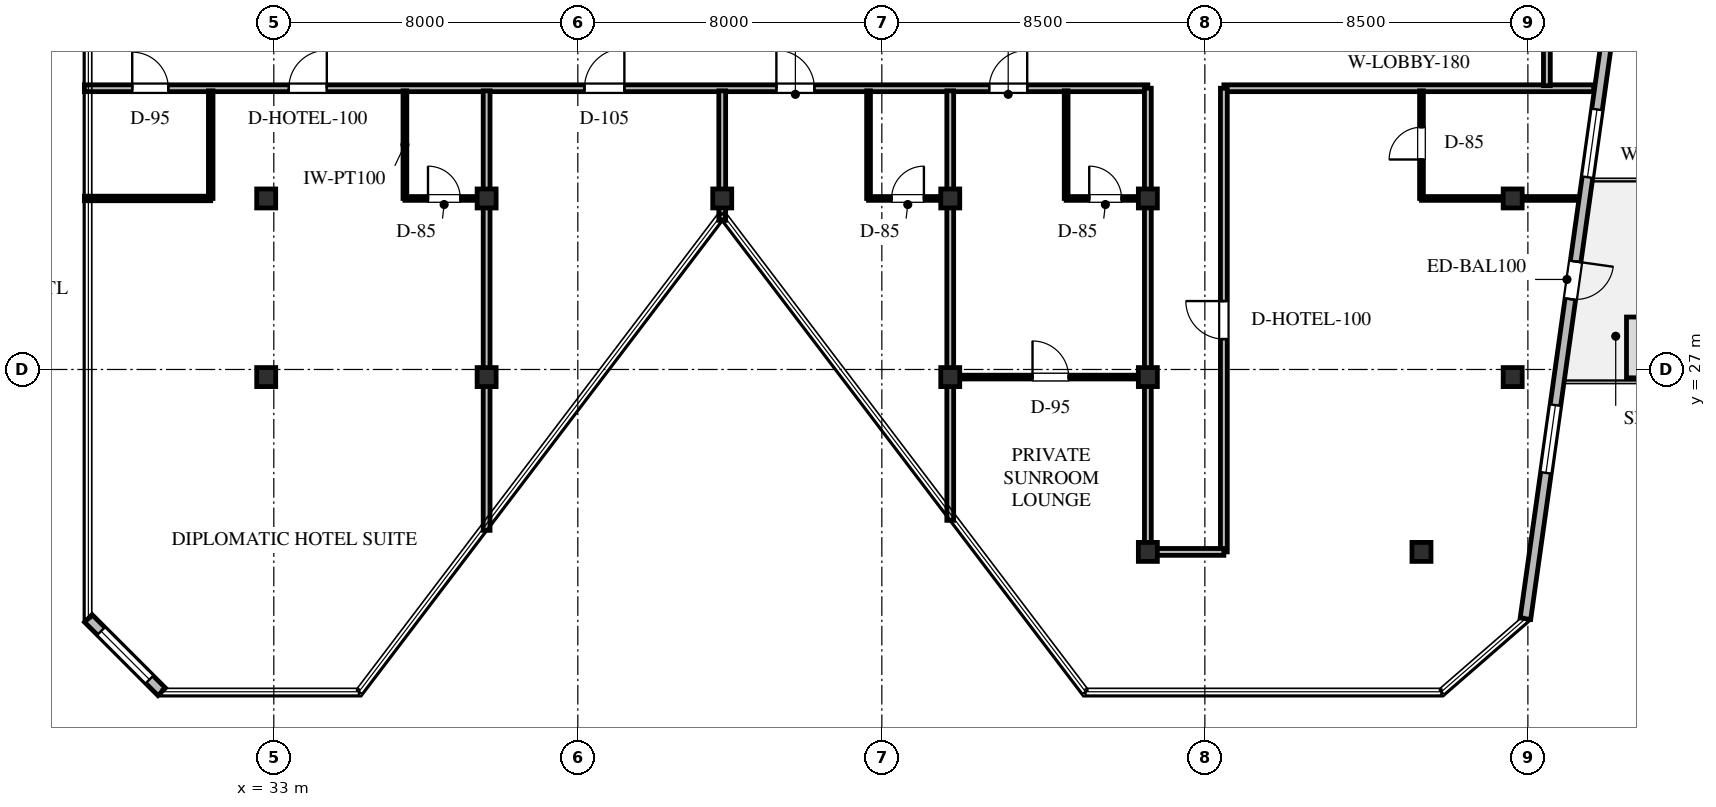
"""IFC4 building model, lengths in metres.
Left out: names, types, materials, properties, quantities, classifications, styles, units other than length and angle.
Written with IfcOpenShell. Run it as: python <this file> out.ifc"""

import sys

from ifc_helpers import new_model, si_unit, direction, frame, frame_2d, origin, origin_2d, place, context, subcontext, project, spatial, rectangle, hollow_rectangle, extrude, element, fill, save


model = new_model("IFC4")
c1 = context("Model", 3, precision=1e-05, world=origin(), true_north=direction((0.0, 1.0)))
c2 = subcontext(c1, "Body", "Model", "MODEL_VIEW")
j1 = project(units=[si_unit("LENGTHUNIT", "METRE"), si_unit("PLANEANGLEUNIT", "RADIAN")], contexts=[c1])
p1 = place(None, origin())
s1 = spatial("IfcSite", under=j1, at=p1, CompositionType="ELEMENT")
p2 = place(p1, origin())
s2 = spatial("IfcBuilding", under=s1, at=p2, CompositionType="ELEMENT")
p3 = place(p2, frame((0.0, 0.0, 270.6)))
s3 = spatial("IfcBuildingStorey", under=s2, at=p3, CompositionType="ELEMENT", Elevation=270.6)
for number, where, z_axis, x_axis in (
    (1, (44.8, 31.5, 0.0), (0.0, 0.0, 1.0), (1.0, 0.0, 0.0)),
    (2, (50.8, 31.5, 0.0), (0.0, 0.0, 1.0), (1.0, 0.0, 0.0)),
    (3, (56.0, 31.5, 0.0), (0.0, 0.0, 1.0), (1.0, 0.0, 0.0)),
    (4, (65.6, 31.5, 0.0), (0.0, 0.0, 1.0), (1.0, 0.0, 0.0)),
    (5, (38.6, 31.5, 0.0), (0.0, 0.0, 1.0), (1.0, 0.0, 0.0)),
    (6, (32.8, 31.5, 0.0), (0.0, 0.0, 1.0), (1.0, 0.0, 0.0)),
    (7, (38.6, 26.8, 0.0), (0.0, 0.0, 1.0), (1.0, 0.0, 0.0)),
    (8, (50.8, 26.8, 0.0), (0.0, 0.0, 1.0), (1.0, 0.0, 0.0)),
    (9, (56.0, 26.8, 0.0), (0.0, 0.0, 1.0), (1.0, 0.0, 0.0)),
    (10, (65.6, 26.8, 0.0), (0.0, 0.0, 1.0), (1.0, 0.0, 0.0)),
    (11, (56.0, 22.2, 0.0), (0.0, 0.0, 1.0), (1.0, 0.0, 0.0)),
    (12, (63.2, 22.2, 0.0), (0.0, 0.0, 1.0), (1.0, 0.0, 0.0)),
    (13, (32.8, 26.8, 0.0), (0.0, 0.0, 1.0), (1.0, 0.0, 0.0)),
):
    element("IfcColumn", number, at=place(p3, frame(where, z_axis=z_axis, x_axis=x_axis)), inside=s3, PredefinedType="COLUMN", context=c2, shape_type="SweptSolid", body=[
        extrude(hollow_rectangle(XDim=0.5, YDim=0.5, WallThickness=0.02, at=origin_2d()), origin(), (0.0, 0.0, 1.0), 3.6),
    ])
p4 = place(p3, frame((68.375, 37.8, 0.0), z_axis=(0.0, 0.0, 1.0), x_axis=(-0.139166909111, -0.990268938929, 0.0)))
e14 = element("IfcWall", 14, at=p4, inside=s3, PredefinedType="STANDARD", context=c2, shape_type="SweptSolid", body=[
    extrude(rectangle(XDim=17.529, YDim=0.28, at=frame_2d((8.765, 0.0))), origin(), (0.0, 0.0, 1.0), 3.36),
])
p5 = place(p4, frame((8.036, 0.0, 0.0)))
e15 = element("IfcOpeningElement", 15, at=p5, cuts=e14, PredefinedType="OPENING", context=c2, shape_type="SweptSolid", body=[
    extrude(rectangle(XDim=1.0, YDim=2.15, at=frame_2d((0.5, 1.075))), frame((0.0, 0.15, 0.0), z_axis=(0.0, -1.0, 0.0), x_axis=(1.0, 0.0, 0.0)), (0.0, 0.0, 1.0), 0.3),
])
p6 = place(p4, frame((3.997, 0.0, 0.65)))
e16 = element("IfcOpeningElement", 16, at=p6, cuts=e14, PredefinedType="OPENING", context=c2, shape_type="SweptSolid", body=[
    extrude(rectangle(XDim=1.8, YDim=2.1, at=frame_2d((0.9, 1.05))), frame((0.0, 0.15, 0.0), z_axis=(0.0, -1.0, 0.0), x_axis=(1.0, 0.0, 0.0)), (0.0, 0.0, 1.0), 0.3),
])
p7 = place(p4, frame((11.853, 0.0, 0.65)))
e17 = element("IfcOpeningElement", 17, at=p7, cuts=e14, PredefinedType="OPENING", context=c2, shape_type="SweptSolid", body=[
    extrude(rectangle(XDim=1.8, YDim=2.1, at=frame_2d((0.9, 1.05))), frame((0.0, 0.15, 0.0), z_axis=(0.0, -1.0, 0.0), x_axis=(1.0, 0.0, 0.0)), (0.0, 0.0, 1.0), 0.3),
])
p8 = place(p3, frame((30.05, 18.52, 0.0), z_axis=(0.0, 0.0, 1.0), x_axis=(-0.707106781187, 0.707106781187, 0.0)))
e18 = element("IfcWall", 18, at=p8, inside=s3, PredefinedType="STANDARD", context=c2, shape_type="SweptSolid", body=[
    extrude(rectangle(XDim=2.729, YDim=0.28, at=frame_2d((1.365, 0.0))), origin(), (0.0, 0.0, 1.0), 3.36),
])
p9 = place(p8, frame((0.455, 0.0, 0.65)))
e19 = element("IfcOpeningElement", 19, at=p9, cuts=e18, PredefinedType="OPENING", context=c2, shape_type="SweptSolid", body=[
    extrude(rectangle(XDim=1.8, YDim=2.1, at=frame_2d((0.9, 1.05))), frame((0.0, 0.15, 0.0), z_axis=(0.0, -1.0, 0.0), x_axis=(1.0, 0.0, 0.0)), (0.0, 0.0, 1.0), 0.3),
])
p10 = place(p3, frame((28.015, 34.4, 0.0), z_axis=(0.0, 0.0, 1.0), x_axis=(1.0, 0.0, 0.0)))
e20 = element("IfcWall", 20, at=p10, inside=s3, PredefinedType="STANDARD", context=c2, shape_type="SweptSolid", body=[
    extrude(rectangle(XDim=27.985, YDim=0.18, at=frame_2d((13.993, 0.0))), origin(), (0.0, 0.0, 1.0), 2.664),
])
p11 = place(p10, frame((1.259, 0.0, 0.0)))
e21 = element("IfcOpeningElement", 21, at=p11, cuts=e20, PredefinedType="OPENING", context=c2, shape_type="SweptSolid", body=[
    extrude(rectangle(XDim=0.95, YDim=2.15, at=frame_2d((0.475, 1.075))), frame((0.0, 0.1, 0.0), z_axis=(0.0, -1.0, 0.0), x_axis=(1.0, 0.0, 0.0)), (0.0, 0.0, 1.0), 0.2),
])
p12 = place(p10, frame((5.38, 0.0, 0.0)))
e22 = element("IfcOpeningElement", 22, at=p12, cuts=e20, PredefinedType="OPENING", context=c2, shape_type="SweptSolid", body=[
    extrude(rectangle(XDim=1.0, YDim=2.15, at=frame_2d((0.5, 1.075))), frame((0.0, 0.1, 0.0), z_axis=(0.0, -1.0, 0.0), x_axis=(1.0, 0.0, 0.0)), (0.0, 0.0, 1.0), 0.2),
])
p13 = place(p10, frame((13.16, 0.0, 0.0)))
e23 = element("IfcOpeningElement", 23, at=p13, cuts=e20, PredefinedType="OPENING", context=c2, shape_type="SweptSolid", body=[
    extrude(rectangle(XDim=1.05, YDim=2.2, at=frame_2d((0.525, 1.1))), frame((0.0, 0.1, 0.0), z_axis=(0.0, -1.0, 0.0), x_axis=(1.0, 0.0, 0.0)), (0.0, 0.0, 1.0), 0.2),
])
p14 = place(p10, frame((18.21, 0.0, 0.0)))
e24 = element("IfcOpeningElement", 24, at=p14, cuts=e20, PredefinedType="OPENING", context=c2, shape_type="SweptSolid", body=[
    extrude(rectangle(XDim=1.0, YDim=2.15, at=frame_2d((0.5, 1.075))), frame((0.0, 0.1, 0.0), z_axis=(0.0, -1.0, 0.0), x_axis=(1.0, 0.0, 0.0)), (0.0, 0.0, 1.0), 0.2),
])
p15 = place(p10, frame((23.81, 0.0, 0.0)))
e25 = element("IfcOpeningElement", 25, at=p15, cuts=e20, PredefinedType="OPENING", context=c2, shape_type="SweptSolid", body=[
    extrude(rectangle(XDim=1.0, YDim=2.15, at=frame_2d((0.5, 1.075))), frame((0.0, 0.1, 0.0), z_axis=(0.0, -1.0, 0.0), x_axis=(1.0, 0.0, 0.0)), (0.0, 0.0, 1.0), 0.2),
])
p16 = place(p3, frame((58.0, 34.4, 0.0), z_axis=(0.0, 0.0, 1.0), x_axis=(1.0, 0.0, 0.0)))
e26 = element("IfcWall", 26, at=p16, inside=s3, PredefinedType="STANDARD", context=c2, shape_type="SweptSolid", body=[
    extrude(rectangle(XDim=9.731, YDim=0.18, at=frame_2d((4.865, 0.0))), origin(), (0.0, 0.0, 1.0), 3.36),
])
p17 = place(p3, frame((66.5, 34.468, 0.0), z_axis=(0.0, 0.0, 1.0), x_axis=(0.0, 1.0, 0.0)))
e27 = element("IfcWall", 27, at=p17, inside=s3, PredefinedType="STANDARD", context=c2, shape_type="SweptSolid", body=[
    extrude(rectangle(XDim=3.582, YDim=0.18, at=frame_2d((1.791, 0.0))), origin(), (0.0, 0.0, 1.0), 2.664),
])
p18 = place(p3, frame((56.0, 22.2, 0.0), z_axis=(0.0, 0.0, 1.0), x_axis=(0.0, 1.0, 0.0)))
e28 = element("IfcWall", 28, at=p18, inside=s3, PredefinedType="STANDARD", context=c2, shape_type="SweptSolid", body=[
    extrude(rectangle(XDim=12.2, YDim=0.18, at=frame_2d((6.1, 0.0))), origin(), (0.0, 0.0, 1.0), 2.664),
])
p19 = place(p3, frame((58.0, 22.2, 0.0), z_axis=(0.0, 0.0, 1.0), x_axis=(0.0, 1.0, 0.0)))
e29 = element("IfcWall", 29, at=p19, inside=s3, PredefinedType="STANDARD", context=c2, shape_type="SweptSolid", body=[
    extrude(rectangle(XDim=12.2, YDim=0.18, at=frame_2d((6.1, 0.0))), origin(), (0.0, 0.0, 1.0), 2.664),
])
p20 = place(p19, frame((5.6, 0.0, 0.0)))
e30 = element("IfcOpeningElement", 30, at=p20, cuts=e29, PredefinedType="OPENING", context=c2, shape_type="SweptSolid", body=[
    extrude(rectangle(XDim=1.0, YDim=2.15, at=frame_2d((0.5, 1.075))), frame((0.0, 0.1, 0.0), z_axis=(0.0, -1.0, 0.0), x_axis=(1.0, 0.0, 0.0)), (0.0, 0.0, 1.0), 0.2),
])
p21 = place(p3, frame((56.0, 22.2, 0.0), z_axis=(0.0, 0.0, 1.0), x_axis=(1.0, 0.0, 0.0)))
e31 = element("IfcWall", 31, at=p21, inside=s3, PredefinedType="STANDARD", context=c2, shape_type="SweptSolid", body=[
    extrude(rectangle(XDim=2.0, YDim=0.18, at=frame_2d((1.0, 0.0))), origin(), (0.0, 0.0, 1.0), 2.664),
])
p22 = place(p3, frame((31.34, 31.5, 0.0), z_axis=(0.0, 0.0, 1.0), x_axis=(0.0, 1.0, 0.0)))
e32 = element("IfcWall", 32, at=p22, inside=s3, PredefinedType="PARTITIONING", context=c2, shape_type="SweptSolid", body=[
    extrude(rectangle(XDim=2.832, YDim=0.12, at=frame_2d((1.416, 0.0))), origin(), (0.0, 0.0, 1.0), 3.36),
])
p23 = place(p3, frame((28.015, 31.5, 0.0), z_axis=(0.0, 0.0, 1.0), x_axis=(1.0, 0.0, 0.0)))
e33 = element("IfcWall", 33, at=p23, inside=s3, PredefinedType="PARTITIONING", context=c2, shape_type="SweptSolid", body=[
    extrude(rectangle(XDim=3.325, YDim=0.12, at=frame_2d((1.663, 0.0))), origin(), (0.0, 0.0, 1.0), 3.36),
])
p24 = place(p3, frame((63.2, 31.5, 0.0), z_axis=(0.0, 0.0, 1.0), x_axis=(1.0, 0.0, 0.0)))
e34 = element("IfcWall", 34, at=p24, inside=s3, PredefinedType="PARTITIONING", context=c2, shape_type="SweptSolid", body=[
    extrude(rectangle(XDim=4.123, YDim=0.1, at=frame_2d((2.062, 0.0))), origin(), (0.0, 0.0, 1.0), 2.664),
])
p25 = place(p3, frame((63.2, 31.5, 0.0), z_axis=(0.0, 0.0, 1.0), x_axis=(0.0, 1.0, 0.0)))
e35 = element("IfcWall", 35, at=p25, inside=s3, PredefinedType="PARTITIONING", context=c2, shape_type="SweptSolid", body=[
    extrude(rectangle(XDim=2.832, YDim=0.1, at=frame_2d((1.416, 0.0))), origin(), (0.0, 0.0, 1.0), 2.664),
])
p26 = place(p25, frame((1.025, 0.0, 0.0)))
e36 = element("IfcOpeningElement", 36, at=p26, cuts=e35, PredefinedType="OPENING", context=c2, shape_type="SweptSolid", body=[
    extrude(rectangle(XDim=0.85, YDim=2.1, at=frame_2d((0.425, 1.05))), frame((0.0, 0.06, 0.0), z_axis=(0.0, -1.0, 0.0), x_axis=(1.0, 0.0, 0.0)), (0.0, 0.0, 1.0), 0.12),
])
p27 = place(p3, frame((36.45, 31.5, 0.0), z_axis=(0.0, 0.0, 1.0), x_axis=(0.0, 1.0, 0.0)))
e37 = element("IfcWall", 37, at=p27, inside=s3, PredefinedType="PARTITIONING", context=c2, shape_type="SweptSolid", body=[
    extrude(rectangle(XDim=2.832, YDim=0.1, at=frame_2d((1.416, 0.0))), origin(), (0.0, 0.0, 1.0), 2.664),
])
p28 = place(p3, frame((36.45, 31.5, 0.0), z_axis=(0.0, 0.0, 1.0), x_axis=(1.0, 0.0, 0.0)))
e38 = element("IfcWall", 38, at=p28, inside=s3, PredefinedType="PARTITIONING", context=c2, shape_type="SweptSolid", body=[
    extrude(rectangle(XDim=2.082, YDim=0.1, at=frame_2d((1.041, 0.0))), origin(), (0.0, 0.0, 1.0), 2.664),
])
p29 = place(p28, frame((0.607, 0.0, 0.0)))
e39 = element("IfcOpeningElement", 39, at=p29, cuts=e38, PredefinedType="OPENING", context=c2, shape_type="SweptSolid", body=[
    extrude(rectangle(XDim=0.85, YDim=2.1, at=frame_2d((0.425, 1.05))), frame((0.0, 0.06, 0.0), z_axis=(0.0, -1.0, 0.0), x_axis=(1.0, 0.0, 0.0)), (0.0, 0.0, 1.0), 0.12),
])
p30 = place(p3, frame((38.6, 22.767, 0.0), z_axis=(0.0, 0.0, 1.0), x_axis=(0.0, 1.0, 0.0)))
e40 = element("IfcWall", 40, at=p30, inside=s3, PredefinedType="STANDARD", context=c2, shape_type="SweptSolid", body=[
    extrude(rectangle(XDim=11.565, YDim=0.18, at=frame_2d((5.783, 0.0))), origin(), (0.0, 0.0, 1.0), 2.664),
])
p31 = place(p3, frame((44.8, 30.925, 0.0), z_axis=(0.0, 0.0, 1.0), x_axis=(0.0, 1.0, 0.0)))
e41 = element("IfcWall", 41, at=p31, inside=s3, PredefinedType="STANDARD", context=c2, shape_type="SweptSolid", body=[
    extrude(rectangle(XDim=3.407, YDim=0.18, at=frame_2d((1.704, 0.0))), origin(), (0.0, 0.0, 1.0), 2.664),
])
p32 = place(p3, frame((48.65, 31.5, 0.0), z_axis=(0.0, 0.0, 1.0), x_axis=(0.0, 1.0, 0.0)))
e42 = element("IfcWall", 42, at=p32, inside=s3, PredefinedType="PARTITIONING", context=c2, shape_type="SweptSolid", body=[
    extrude(rectangle(XDim=2.832, YDim=0.1, at=frame_2d((1.416, 0.0))), origin(), (0.0, 0.0, 1.0), 2.664),
])
p33 = place(p3, frame((48.65, 31.5, 0.0), z_axis=(0.0, 0.0, 1.0), x_axis=(1.0, 0.0, 0.0)))
e43 = element("IfcWall", 43, at=p33, inside=s3, PredefinedType="PARTITIONING", context=c2, shape_type="SweptSolid", body=[
    extrude(rectangle(XDim=2.082, YDim=0.1, at=frame_2d((1.041, 0.0))), origin(), (0.0, 0.0, 1.0), 2.664),
])
p34 = place(p33, frame((0.607, 0.0, 0.0)))
e44 = element("IfcOpeningElement", 44, at=p34, cuts=e43, PredefinedType="OPENING", context=c2, shape_type="SweptSolid", body=[
    extrude(rectangle(XDim=0.85, YDim=2.1, at=frame_2d((0.425, 1.05))), frame((0.0, 0.06, 0.0), z_axis=(0.0, -1.0, 0.0), x_axis=(1.0, 0.0, 0.0)), (0.0, 0.0, 1.0), 0.12),
])
p35 = place(p3, frame((50.8, 23.03, 0.0), z_axis=(0.0, 0.0, 1.0), x_axis=(0.0, 1.0, 0.0)))
e45 = element("IfcWall", 45, at=p35, inside=s3, PredefinedType="STANDARD", context=c2, shape_type="SweptSolid", body=[
    extrude(rectangle(XDim=11.302, YDim=0.18, at=frame_2d((5.651, 0.0))), origin(), (0.0, 0.0, 1.0), 2.664),
])
p36 = place(p3, frame((50.868, 26.8, 0.0), z_axis=(0.0, 0.0, 1.0), x_axis=(1.0, 0.0, 0.0)))
e46 = element("IfcWall", 46, at=p36, inside=s3, PredefinedType="PARTITIONING", context=c2, shape_type="SweptSolid", body=[
    extrude(rectangle(XDim=5.064, YDim=0.1, at=frame_2d((2.532, 0.0))), origin(), (0.0, 0.0, 1.0), 2.664),
])
p37 = place(p36, frame((2.097, 0.0, 0.0)))
e47 = element("IfcOpeningElement", 47, at=p37, cuts=e46, PredefinedType="OPENING", context=c2, shape_type="SweptSolid", body=[
    extrude(rectangle(XDim=0.95, YDim=2.15, at=frame_2d((0.475, 1.075))), frame((0.0, 0.06, 0.0), z_axis=(0.0, -1.0, 0.0), x_axis=(1.0, 0.0, 0.0)), (0.0, 0.0, 1.0), 0.12),
])
p38 = place(p3, frame((53.85, 31.5, 0.0), z_axis=(0.0, 0.0, 1.0), x_axis=(0.0, 1.0, 0.0)))
e48 = element("IfcWall", 48, at=p38, inside=s3, PredefinedType="PARTITIONING", context=c2, shape_type="SweptSolid", body=[
    extrude(rectangle(XDim=2.832, YDim=0.1, at=frame_2d((1.416, 0.0))), origin(), (0.0, 0.0, 1.0), 2.664),
])
p39 = place(p3, frame((53.85, 31.5, 0.0), z_axis=(0.0, 0.0, 1.0), x_axis=(1.0, 0.0, 0.0)))
e49 = element("IfcWall", 49, at=p39, inside=s3, PredefinedType="PARTITIONING", context=c2, shape_type="SweptSolid", body=[
    extrude(rectangle(XDim=2.082, YDim=0.1, at=frame_2d((1.041, 0.0))), origin(), (0.0, 0.0, 1.0), 2.664),
])
p40 = place(p39, frame((0.607, 0.0, 0.0)))
e50 = element("IfcOpeningElement", 50, at=p40, cuts=e49, PredefinedType="OPENING", context=c2, shape_type="SweptSolid", body=[
    extrude(rectangle(XDim=0.85, YDim=2.1, at=frame_2d((0.425, 1.05))), frame((0.0, 0.06, 0.0), z_axis=(0.0, -1.0, 0.0), x_axis=(1.0, 0.0, 0.0)), (0.0, 0.0, 1.0), 0.12),
])
p41 = place(p5, origin())
e51 = element("IfcDoor", 51, at=p41, inside=s3, OperationType="SINGLE_SWING_LEFT", PredefinedType="DOOR", context=c2, shape_type="SweptSolid", body=[
    extrude(rectangle(XDim=1.0, YDim=2.15, at=frame_2d((0.5, 1.075))), frame((0.0, 0.025, 0.0), z_axis=(0.0, -1.0, 0.0), x_axis=(1.0, 0.0, 0.0)), (0.0, 0.0, 1.0), 0.05),
])
fill(e15, e51)
p42 = place(p6, origin())
e52 = element("IfcWindow", 52, at=p42, inside=s3, PartitioningType="SINGLE_PANEL", PredefinedType="WINDOW", context=c2, shape_type="SweptSolid", body=[
    extrude(rectangle(XDim=1.8, YDim=2.1, at=frame_2d((0.9, 1.05))), frame((0.0, 0.03, 0.0), z_axis=(0.0, -1.0, 0.0), x_axis=(1.0, 0.0, 0.0)), (0.0, 0.0, 1.0), 0.06),
])
fill(e16, e52)
p43 = place(p7, origin())
e53 = element("IfcWindow", 53, at=p43, inside=s3, PartitioningType="SINGLE_PANEL", PredefinedType="WINDOW", context=c2, shape_type="SweptSolid", body=[
    extrude(rectangle(XDim=1.8, YDim=2.1, at=frame_2d((0.9, 1.05))), frame((0.0, 0.03, 0.0), z_axis=(0.0, -1.0, 0.0), x_axis=(1.0, 0.0, 0.0)), (0.0, 0.0, 1.0), 0.06),
])
fill(e17, e53)
p44 = place(p9, origin())
e54 = element("IfcWindow", 54, at=p44, inside=s3, PartitioningType="SINGLE_PANEL", PredefinedType="WINDOW", context=c2, shape_type="SweptSolid", body=[
    extrude(rectangle(XDim=1.8, YDim=2.1, at=frame_2d((0.9, 1.05))), frame((0.0, 0.03, 0.0), z_axis=(0.0, -1.0, 0.0), x_axis=(1.0, 0.0, 0.0)), (0.0, 0.0, 1.0), 0.06),
])
fill(e19, e54)
p45 = place(p11, origin())
e55 = element("IfcDoor", 55, at=p45, inside=s3, OperationType="SINGLE_SWING_LEFT", PredefinedType="DOOR", context=c2, shape_type="SweptSolid", body=[
    extrude(rectangle(XDim=0.95, YDim=2.15, at=frame_2d((0.475, 1.075))), frame((0.0, 0.025, 0.0), z_axis=(0.0, -1.0, 0.0), x_axis=(1.0, 0.0, 0.0)), (0.0, 0.0, 1.0), 0.05),
])
fill(e21, e55)
p46 = place(p20, origin())
e56 = element("IfcDoor", 56, at=p46, inside=s3, OperationType="SINGLE_SWING_RIGHT", PredefinedType="DOOR", context=c2, shape_type="SweptSolid", body=[
    extrude(rectangle(XDim=1.0, YDim=2.15, at=frame_2d((0.5, 1.075))), frame((0.0, 0.025, 0.0), z_axis=(0.0, -1.0, 0.0), x_axis=(1.0, 0.0, 0.0)), (0.0, 0.0, 1.0), 0.05),
])
fill(e30, e56)
p47 = place(p26, origin())
e57 = element("IfcDoor", 57, at=p47, inside=s3, OperationType="SINGLE_SWING_LEFT", PredefinedType="DOOR", context=c2, shape_type="SweptSolid", body=[
    extrude(rectangle(XDim=0.85, YDim=2.1, at=frame_2d((0.425, 1.05))), frame((0.0, 0.025, 0.0), z_axis=(0.0, -1.0, 0.0), x_axis=(1.0, 0.0, 0.0)), (0.0, 0.0, 1.0), 0.05),
])
fill(e36, e57)
p48 = place(p12, origin())
e58 = element("IfcDoor", 58, at=p48, inside=s3, OperationType="SINGLE_SWING_RIGHT", PredefinedType="DOOR", context=c2, shape_type="SweptSolid", body=[
    extrude(rectangle(XDim=1.0, YDim=2.15, at=frame_2d((0.5, 1.075))), frame((0.0, 0.025, 0.0), z_axis=(0.0, -1.0, 0.0), x_axis=(1.0, 0.0, 0.0)), (0.0, 0.0, 1.0), 0.05),
])
fill(e22, e58)
p49 = place(p29, origin())
e59 = element("IfcDoor", 59, at=p49, inside=s3, OperationType="SINGLE_SWING_LEFT", PredefinedType="DOOR", context=c2, shape_type="SweptSolid", body=[
    extrude(rectangle(XDim=0.85, YDim=2.1, at=frame_2d((0.425, 1.05))), frame((0.0, 0.025, 0.0), z_axis=(0.0, -1.0, 0.0), x_axis=(1.0, 0.0, 0.0)), (0.0, 0.0, 1.0), 0.05),
])
fill(e39, e59)
p50 = place(p13, origin())
e60 = element("IfcDoor", 60, at=p50, inside=s3, OperationType="SINGLE_SWING_RIGHT", PredefinedType="DOOR", context=c2, shape_type="SweptSolid", body=[
    extrude(rectangle(XDim=1.05, YDim=2.2, at=frame_2d((0.525, 1.1))), frame((0.0, 0.025, 0.0), z_axis=(0.0, -1.0, 0.0), x_axis=(1.0, 0.0, 0.0)), (0.0, 0.0, 1.0), 0.05),
])
fill(e23, e60)
p51 = place(p14, origin())
e61 = element("IfcDoor", 61, at=p51, inside=s3, OperationType="SINGLE_SWING_LEFT", PredefinedType="DOOR", context=c2, shape_type="SweptSolid", body=[
    extrude(rectangle(XDim=1.0, YDim=2.15, at=frame_2d((0.5, 1.075))), frame((0.0, 0.025, 0.0), z_axis=(0.0, -1.0, 0.0), x_axis=(1.0, 0.0, 0.0)), (0.0, 0.0, 1.0), 0.05),
])
fill(e24, e61)
p52 = place(p34, origin())
e62 = element("IfcDoor", 62, at=p52, inside=s3, OperationType="SINGLE_SWING_RIGHT", PredefinedType="DOOR", context=c2, shape_type="SweptSolid", body=[
    extrude(rectangle(XDim=0.85, YDim=2.1, at=frame_2d((0.425, 1.05))), frame((0.0, 0.025, 0.0), z_axis=(0.0, -1.0, 0.0), x_axis=(1.0, 0.0, 0.0)), (0.0, 0.0, 1.0), 0.05),
])
fill(e44, e62)
p53 = place(p37, origin())
e63 = element("IfcDoor", 63, at=p53, inside=s3, OperationType="SINGLE_SWING_LEFT", PredefinedType="DOOR", context=c2, shape_type="SweptSolid", body=[
    extrude(rectangle(XDim=0.95, YDim=2.15, at=frame_2d((0.475, 1.075))), frame((0.0, 0.025, 0.0), z_axis=(0.0, -1.0, 0.0), x_axis=(1.0, 0.0, 0.0)), (0.0, 0.0, 1.0), 0.05),
])
fill(e47, e63)
p54 = place(p15, origin())
e64 = element("IfcDoor", 64, at=p54, inside=s3, OperationType="SINGLE_SWING_RIGHT", PredefinedType="DOOR", context=c2, shape_type="SweptSolid", body=[
    extrude(rectangle(XDim=1.0, YDim=2.15, at=frame_2d((0.5, 1.075))), frame((0.0, 0.025, 0.0), z_axis=(0.0, -1.0, 0.0), x_axis=(1.0, 0.0, 0.0)), (0.0, 0.0, 1.0), 0.05),
])
fill(e25, e64)
p55 = place(p40, origin())
e65 = element("IfcDoor", 65, at=p55, inside=s3, OperationType="SINGLE_SWING_LEFT", PredefinedType="DOOR", context=c2, shape_type="SweptSolid", body=[
    extrude(rectangle(XDim=0.85, YDim=2.1, at=frame_2d((0.425, 1.05))), frame((0.0, 0.025, 0.0), z_axis=(0.0, -1.0, 0.0), x_axis=(1.0, 0.0, 0.0)), (0.0, 0.0, 1.0), 0.05),
])
fill(e50, e65)
save(model, sys.argv[1])
